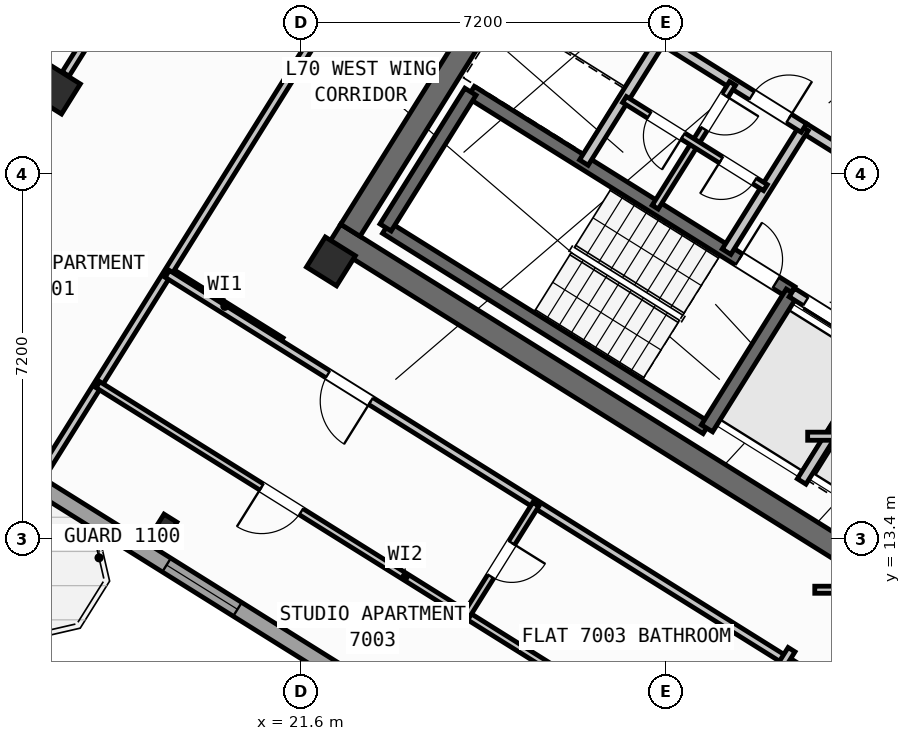
"""IFC4 building model, lengths in metres.
Left out: names, types, materials, properties, quantities, classifications, styles, units other than length and angle.
Written with IfcOpenShell. Run it as: python <this file> out.ifc"""

import sys

from ifc_helpers import new_model, si_unit, direction, frame, frame_2d, origin, origin_2d, place, context, subcontext, project, spatial, rectangle, hollow_rectangle, i_section, extrude, source, transform, mapped, element, fill, save


model = new_model("IFC4")
c1 = context("Model", 3, precision=1e-05, world=origin(), true_north=direction((0.0, 1.0)))
c2 = subcontext(c1, "Body", "Model", "MODEL_VIEW")
j1 = project(units=[si_unit("LENGTHUNIT", "METRE"), si_unit("PLANEANGLEUNIT", "RADIAN")], contexts=[c1])
p1 = place(None, origin())
s1 = spatial("IfcSite", under=j1, at=p1, CompositionType="ELEMENT")
p2 = place(p1, origin())
s2 = spatial("IfcBuilding", under=s1, at=p2, CompositionType="ELEMENT")
p3 = place(p2, frame((0.0, 0.0, 277.2)))
s3 = spatial("IfcBuildingStorey", under=s2, at=p3, CompositionType="ELEMENT", Elevation=277.2)
p4 = place(p3, frame((33.324, 12.503, 0.0), z_axis=(0.0, 0.0, 1.0), x_axis=(-0.848043529849, 0.529926571782, 0.0)))
e1 = element("IfcWall", 1, at=p4, inside=s3, PredefinedType="SHEAR", context=c2, shape_type="SweptSolid", body=[
    extrude(rectangle(XDim=13.04, YDim=0.45, at=frame_2d((6.52, 0.0))), origin(), (0.0, 0.0, 1.0), 3.35),
])
p5 = place(p3, frame((26.007, 24.976, 0.0), z_axis=(0.0, 0.0, 1.0), x_axis=(-0.529931155655, -0.848040665456, 0.0)))
e2 = element("IfcWall", 2, at=p5, inside=s3, PredefinedType="SHEAR", context=c2, shape_type="SweptSolid", body=[
    extrude(rectangle(XDim=6.475, YDim=0.45, at=frame_2d((3.238, 0.0))), origin(), (0.0, 0.0, 1.0), 3.35),
])
m1 = source(origin(), c2, "Body", "SweptSolid", [
    extrude(hollow_rectangle(XDim=0.7, YDim=0.7, WallThickness=0.028, at=origin_2d()), origin(), (0.0, 0.0, 1.0), 3.6),
])
p6 = place(p3, frame((22.191, 18.87, 0.0), z_axis=(0.0, 0.0, 1.0), x_axis=(-0.848048096156, 0.529919264233, 0.0)))
e3 = element("IfcColumn", 3, at=p6, inside=s3, PredefinedType="COLUMN", context=c2, shape_type="MappedRepresentation", body=[
    mapped(m1, transform((0.0, 0.0, 0.0), scale=1.0)),
])
m2 = source(origin(), c2, "Body", "SweptSolid", [
    extrude(i_section(OverallWidth=0.3, OverallDepth=0.45, WebThickness=0.014, FlangeThickness=0.026, at=origin_2d()), origin(), (0.0, 0.0, 1.0), 3.6),
])
p7 = place(p3, frame((18.906, 13.612, 0.0), z_axis=(0.0, 0.0, 1.0), x_axis=(-0.848048096156, 0.529919264233, 0.0)))
e4 = element("IfcColumn", 4, at=p7, inside=s3, PredefinedType="COLUMN", context=c2, shape_type="MappedRepresentation", body=[
    mapped(m2, transform((0.0, 0.0, 0.0), scale=1.0)),
])
p8 = place(p3, frame((16.764, 22.261, 0.0), z_axis=(0.0, 0.0, 1.0), x_axis=(-0.848048096156, 0.529919264233, 0.0)))
e5 = element("IfcColumn", 5, at=p8, inside=s3, PredefinedType="COLUMN", context=c2, shape_type="MappedRepresentation", body=[
    mapped(m1, transform((0.0, 0.0, 0.0), scale=1.0)),
])
p9 = place(p3, frame((29.268, 6.429, 0.0), z_axis=(0.0, 0.0, 1.0), x_axis=(-0.848049971435, 0.529916263149, 0.0)))
e6 = element("IfcWall", 6, at=p9, inside=s3, PredefinedType="STANDARD", context=c2, shape_type="SweptSolid", body=[
    extrude(rectangle(XDim=31.588, YDim=0.32, at=frame_2d((15.794, 0.0))), origin(), (0.0, 0.0, 1.0), 3.35),
])
p10 = place(p9, frame((16.362, 0.0, 0.0)))
e7 = element("IfcOpeningElement", 7, at=p10, cuts=e6, PredefinedType="OPENING", context=c2, shape_type="SweptSolid", body=[
    extrude(rectangle(XDim=1.2, YDim=2.15, at=frame_2d((0.6, 1.075))), frame((0.0, 0.17, 0.0), z_axis=(0.0, -1.0, 0.0), x_axis=(1.0, 0.0, 0.0)), (0.0, 0.0, 1.0), 0.34),
])
p11 = place(p9, frame((3.859, 0.0, 0.9)))
e8 = element("IfcOpeningElement", 8, at=p11, cuts=e6, PredefinedType="OPENING", context=c2, shape_type="SweptSolid", body=[
    extrude(rectangle(XDim=1.65, YDim=1.45, at=frame_2d((0.825, 0.725))), frame((0.0, 0.17, 0.0), z_axis=(0.0, -1.0, 0.0), x_axis=(1.0, 0.0, 0.0)), (0.0, 0.0, 1.0), 0.34),
])
p12 = place(p9, frame((10.519, 0.0, 0.9)))
e9 = element("IfcOpeningElement", 9, at=p12, cuts=e6, PredefinedType="OPENING", context=c2, shape_type="SweptSolid", body=[
    extrude(rectangle(XDim=1.65, YDim=1.45, at=frame_2d((0.825, 0.725))), frame((0.0, 0.17, 0.0), z_axis=(0.0, -1.0, 0.0), x_axis=(1.0, 0.0, 0.0)), (0.0, 0.0, 1.0), 0.34),
])
p13 = place(p9, frame((20.015, 0.0, 0.95)))
e10 = element("IfcOpeningElement", 10, at=p13, cuts=e6, PredefinedType="OPENING", context=c2, shape_type="SweptSolid", body=[
    extrude(rectangle(XDim=1.95, YDim=1.35, at=frame_2d((0.975, 0.675))), frame((0.0, 0.17, 0.0), z_axis=(0.0, -1.0, 0.0), x_axis=(1.0, 0.0, 0.0)), (0.0, 0.0, 1.0), 0.34),
])
p14 = place(p9, frame((23.715, 0.0, 1.0)))
e11 = element("IfcOpeningElement", 11, at=p14, cuts=e6, PredefinedType="OPENING", context=c2, shape_type="SweptSolid", body=[
    extrude(rectangle(XDim=0.9, YDim=1.25, at=frame_2d((0.45, 0.625))), frame((0.0, 0.17, 0.0), z_axis=(0.0, -1.0, 0.0), x_axis=(1.0, 0.0, 0.0)), (0.0, 0.0, 1.0), 0.34),
])
p15 = place(p9, frame((27.706, 0.0, 0.9)))
e12 = element("IfcOpeningElement", 12, at=p15, cuts=e6, PredefinedType="OPENING", context=c2, shape_type="SweptSolid", body=[
    extrude(rectangle(XDim=1.65, YDim=1.45, at=frame_2d((0.825, 0.725))), frame((0.0, 0.17, 0.0), z_axis=(0.0, -1.0, 0.0), x_axis=(1.0, 0.0, 0.0)), (0.0, 0.0, 1.0), 0.34),
])
p16 = place(p3, frame((29.605, 15.581, 0.0), z_axis=(0.0, 0.0, 1.0), x_axis=(-0.848036911448, 0.529937163087, 0.0)))
e13 = element("IfcWall", 13, at=p16, inside=s3, PredefinedType="SHEAR", context=c2, shape_type="SweptSolid", body=[
    extrude(rectangle(XDim=7.46, YDim=0.26, at=frame_2d((3.73, 0.0))), origin(), (0.0, 0.0, 1.0), 3.35),
])
p17 = place(p3, frame((31.28, 18.261, 0.0), z_axis=(0.0, 0.0, 1.0), x_axis=(-0.848051618787, 0.529913626805, 0.0)))
e14 = element("IfcWall", 14, at=p17, inside=s3, PredefinedType="SHEAR", context=c2, shape_type="SweptSolid", body=[
    extrude(rectangle(XDim=7.46, YDim=0.26, at=frame_2d((3.73, 0.0))), origin(), (0.0, 0.0, 1.0), 3.35),
])
p18 = place(p17, frame((0.36, 0.0, 0.0)))
e15 = element("IfcOpeningElement", 15, at=p18, cuts=e14, PredefinedType="OPENING", context=c2, shape_type="SweptSolid", body=[
    extrude(rectangle(XDim=0.86, YDim=2.05, at=frame_2d((0.43, 1.025))), frame((0.0, 0.14, 0.0), z_axis=(0.0, -1.0, 0.0), x_axis=(1.0, 0.0, 0.0)), (0.0, 0.0, 1.0), 0.28),
])
p19 = place(p3, frame((31.288, 18.256, 0.0), z_axis=(0.0, 0.0, 1.0), x_axis=(-0.529943379326, -0.848033026897, 0.0)))
e16 = element("IfcWall", 16, at=p19, inside=s3, PredefinedType="SHEAR", context=c2, shape_type="SweptSolid", body=[
    extrude(rectangle(XDim=3.16, YDim=0.26, at=frame_2d((1.58, 0.0))), origin(), (0.0, 0.0, 1.0), 3.35),
])
p20 = place(p3, frame((24.945, 22.22, 0.0), z_axis=(0.0, 0.0, 1.0), x_axis=(-0.529908658664, -0.84805472316, 0.0)))
e17 = element("IfcWall", 17, at=p20, inside=s3, PredefinedType="SHEAR", context=c2, shape_type="SweptSolid", body=[
    extrude(rectangle(XDim=3.16, YDim=0.26, at=frame_2d((1.58, 0.0))), origin(), (0.0, 0.0, 1.0), 3.35),
])
p21 = place(p3, frame((38.046, 21.108, 0.0), z_axis=(0.0, 0.0, 1.0), x_axis=(-0.848054434086, 0.529909121291, 0.0)))
e18 = element("IfcWall", 18, at=p21, inside=s3, PredefinedType="SHEAR", context=c2, shape_type="SweptSolid", body=[
    extrude(rectangle(XDim=7.33, YDim=0.26, at=frame_2d((3.665, 0.0))), origin(), (0.0, 0.0, 1.0), 3.35),
])
p22 = place(p21, frame((0.22, 0.0, 0.0)))
e19 = element("IfcOpeningElement", 19, at=p22, cuts=e18, PredefinedType="OPENING", context=c2, shape_type="SweptSolid", body=[
    extrude(rectangle(XDim=1.1, YDim=2.1, at=frame_2d((0.55, 1.05))), frame((0.0, 0.14, 0.0), z_axis=(0.0, -1.0, 0.0), x_axis=(1.0, 0.0, 0.0)), (0.0, 0.0, 1.0), 0.28),
])
p23 = place(p3, frame((34.933, 15.978, 0.0), z_axis=(0.0, 0.0, 1.0), x_axis=(-0.848055739377, 0.529907032327, 0.0)))
e20 = element("IfcWall", 20, at=p23, inside=s3, PredefinedType="STANDARD", context=c2, shape_type="SweptSolid", body=[
    extrude(rectangle(XDim=4.298, YDim=0.2, at=frame_2d((2.149, 0.0))), origin(), (0.0, 0.0, 1.0), 3.34),
])
p24 = place(p23, frame((0.448, 0.0, 0.0)))
e21 = element("IfcOpeningElement", 21, at=p24, cuts=e20, PredefinedType="OPENING", context=c2, shape_type="SweptSolid", body=[
    extrude(rectangle(XDim=1.3, YDim=2.2, at=frame_2d((0.65, 1.1))), frame((0.0, 0.11, 0.0), z_axis=(0.0, -1.0, 0.0), x_axis=(1.0, 0.0, 0.0)), (0.0, 0.0, 1.0), 0.22),
])
p25 = place(p23, frame((2.523, 0.0, 0.0)))
e22 = element("IfcOpeningElement", 22, at=p25, cuts=e20, PredefinedType="OPENING", context=c2, shape_type="SweptSolid", body=[
    extrude(rectangle(XDim=1.45, YDim=2.25, at=frame_2d((0.725, 1.125))), frame((0.0, 0.11, 0.0), z_axis=(0.0, -1.0, 0.0), x_axis=(1.0, 0.0, 0.0)), (0.0, 0.0, 1.0), 0.22),
])
p26 = place(p3, frame((36.459, 18.421, 0.0), z_axis=(0.0, 0.0, 1.0), x_axis=(-0.848059591691, 0.529900867089, 0.0)))
e23 = element("IfcWall", 23, at=p26, inside=s3, PredefinedType="STANDARD", context=c2, shape_type="SweptSolid", body=[
    extrude(rectangle(XDim=5.818, YDim=0.2, at=frame_2d((2.909, 0.0))), origin(), (0.0, 0.0, 1.0), 3.34),
])
p27 = place(p26, frame((2.598, 0.0, 0.0)))
e24 = element("IfcOpeningElement", 24, at=p27, cuts=e23, PredefinedType="OPENING", context=c2, shape_type="SweptSolid", body=[
    extrude(rectangle(XDim=1.15, YDim=2.1, at=frame_2d((0.575, 1.05))), frame((0.0, 0.11, 0.0), z_axis=(0.0, -1.0, 0.0), x_axis=(1.0, 0.0, 0.0)), (0.0, 0.0, 1.0), 0.22),
])
p28 = place(p3, frame((33.029, 17.003, 0.0), z_axis=(0.0, 0.0, 1.0), x_axis=(-0.529916267533, -0.848049968695, 0.0)))
e25 = element("IfcWall", 25, at=p28, inside=s3, PredefinedType="STANDARD", context=c2, shape_type="SweptSolid", body=[
    extrude(rectangle(XDim=2.92, YDim=0.2, at=frame_2d((1.46, 0.0))), origin(), (0.0, 0.0, 1.0), 3.34),
])
for number, where, z_axis, x_axis in (
    (26, (31.525, 21.504, 0.0), (0.0, 0.0, 1.0), (-0.53, -0.848, 0.0)),
    (27, (28.71, 23.263, 0.0), (0.0, 0.0, 1.0), (-0.53, -0.848, 0.0)),
):
    element("IfcWall", number, at=place(p3, frame(where, z_axis=z_axis, x_axis=x_axis)), inside=s3, PredefinedType="STANDARD", context=c2, shape_type="SweptSolid", body=[
        extrude(rectangle(XDim=2.88, YDim=0.2, at=frame_2d((1.44, 0.0))), origin(), (0.0, 0.0, 1.0), 3.34),
    ])
p29 = place(p3, frame((31.525, 21.504, 0.0), z_axis=(0.0, 0.0, 1.0), x_axis=(-0.848042066329, 0.529928913853, 0.0)))
e28 = element("IfcWall", 28, at=p29, inside=s3, PredefinedType="STANDARD", context=c2, shape_type="SweptSolid", body=[
    extrude(rectangle(XDim=6.268, YDim=0.2, at=frame_2d((3.134, 0.0))), origin(), (0.0, 0.0, 1.0), 3.34),
])
p30 = place(p29, frame((4.4, 0.0, 0.0)))
e29 = element("IfcOpeningElement", 29, at=p30, cuts=e28, PredefinedType="OPENING", context=c2, shape_type="SweptSolid", body=[
    extrude(rectangle(XDim=0.86, YDim=2.05, at=frame_2d((0.43, 1.025))), frame((0.0, 0.11, 0.0), z_axis=(0.0, -1.0, 0.0), x_axis=(1.0, 0.0, 0.0)), (0.0, 0.0, 1.0), 0.22),
])
p31 = place(p29, frame((0.35, 0.0, 0.0)))
e30 = element("IfcOpeningElement", 30, at=p31, cuts=e28, PredefinedType="OPENING", context=c2, shape_type="SweptSolid", body=[
    extrude(rectangle(XDim=0.86, YDim=2.05, at=frame_2d((0.43, 1.025))), frame((0.0, 0.11, 0.0), z_axis=(0.0, -1.0, 0.0), x_axis=(1.0, 0.0, 0.0)), (0.0, 0.0, 1.0), 0.22),
])
p32 = place(p3, frame((30.117, 22.384, 0.0), z_axis=(0.0, 0.0, 1.0), x_axis=(-0.529951914384, -0.848027693204, 0.0)))
e31 = element("IfcWall", 31, at=p32, inside=s3, PredefinedType="PLUMBINGWALL", context=c2, shape_type="SweptSolid", body=[
    extrude(rectangle(XDim=1.4, YDim=0.14, at=frame_2d((0.7, 0.0))), origin(), (0.0, 0.0, 1.0), 3.34),
])
p33 = place(p32, frame((0.28, 0.0, 0.0)))
e32 = element("IfcOpeningElement", 32, at=p33, cuts=e31, PredefinedType="OPENING", context=c2, shape_type="SweptSolid", body=[
    extrude(rectangle(XDim=0.78, YDim=2.05, at=frame_2d((0.39, 1.025))), frame((0.0, 0.08, 0.0), z_axis=(0.0, -1.0, 0.0), x_axis=(1.0, 0.0, 0.0)), (0.0, 0.0, 1.0), 0.16),
])
p34 = place(p3, frame((29.375, 21.196, 0.0), z_axis=(0.0, 0.0, 1.0), x_axis=(-0.529865479138, -0.848081702443, 0.0)))
e33 = element("IfcWall", 33, at=p34, inside=s3, PredefinedType="PLUMBINGWALL", context=c2, shape_type="SweptSolid", body=[
    extrude(rectangle(XDim=1.48, YDim=0.14, at=frame_2d((0.74, 0.0))), origin(), (0.0, 0.0, 1.0), 3.34),
])
p35 = place(p3, frame((30.766, 20.327, 0.0), z_axis=(0.0, 0.0, 1.0), x_axis=(-0.848052663127, 0.529911955482, 0.0)))
e34 = element("IfcWall", 34, at=p35, inside=s3, PredefinedType="PLUMBINGWALL", context=c2, shape_type="SweptSolid", body=[
    extrude(rectangle(XDim=3.28, YDim=0.14, at=frame_2d((1.64, 0.0))), origin(), (0.0, 0.0, 1.0), 3.34),
])
p36 = place(p35, frame((0.25, 0.0, 0.0)))
e35 = element("IfcOpeningElement", 35, at=p36, cuts=e34, PredefinedType="OPENING", context=c2, shape_type="SweptSolid", body=[
    extrude(rectangle(XDim=0.78, YDim=2.05, at=frame_2d((0.39, 1.025))), frame((0.0, 0.08, 0.0), z_axis=(0.0, -1.0, 0.0), x_axis=(1.0, 0.0, 0.0)), (0.0, 0.0, 1.0), 0.16),
])
p37 = place(p35, frame((1.92, 0.0, 0.0)))
e36 = element("IfcOpeningElement", 36, at=p37, cuts=e34, PredefinedType="OPENING", context=c2, shape_type="SweptSolid", body=[
    extrude(rectangle(XDim=0.78, YDim=2.05, at=frame_2d((0.39, 1.025))), frame((0.0, 0.08, 0.0), z_axis=(0.0, -1.0, 0.0), x_axis=(1.0, 0.0, 0.0)), (0.0, 0.0, 1.0), 0.16),
])
p38 = place(p3, frame((21.206, 17.292, 0.0), z_axis=(0.0, 0.0, 1.0), x_axis=(-0.848050851465, 0.529914854792, 0.0)))
e37 = element("IfcWall", 37, at=p38, inside=s3, PredefinedType="PARTITIONING", context=c2, shape_type="SweptSolid", body=[
    extrude(rectangle(XDim=2.61, YDim=0.16, at=frame_2d((1.305, 0.0))), origin(), (0.0, 0.0, 1.0), 3.34),
])
p39 = place(p3, frame((24.588, 27.631, 0.0), z_axis=(0.0, 0.0, 1.0), x_axis=(-0.529914586043, -0.848051019396, 0.0)))
e38 = element("IfcWall", 38, at=p39, inside=s3, PredefinedType="PARTITIONING", context=c2, shape_type="SweptSolid", body=[
    extrude(rectangle(XDim=15.35, YDim=0.16, at=frame_2d((7.675, 0.0))), origin(), (0.0, 0.0, 1.0), 3.34),
])
p40 = place(p3, frame((20.44, 28.145, 0.0), z_axis=(0.0, 0.0, 1.0), x_axis=(-0.529938869374, -0.84803584519, 0.0)))
e39 = element("IfcWall", 39, at=p40, inside=s3, PredefinedType="PARTITIONING", context=c2, shape_type="SweptSolid", body=[
    extrude(rectangle(XDim=6.576, YDim=0.16, at=frame_2d((3.288, 0.0))), origin(), (0.0, 0.0, 1.0), 2.875),
])
p41 = place(p3, frame((32.164, 10.374, 0.0), z_axis=(0.0, 0.0, 1.0), x_axis=(-0.848044107957, 0.529925646633, 0.0)))
e40 = element("IfcWall", 40, at=p41, inside=s3, PredefinedType="PARTITIONING", context=c2, shape_type="SweptSolid", body=[
    extrude(rectangle(XDim=15.57, YDim=0.16, at=frame_2d((7.785, 0.0))), origin(), (0.0, 0.0, 1.0), 3.34),
])
p42 = place(p41, frame((10.83, 0.0, 0.0)))
e41 = element("IfcOpeningElement", 41, at=p42, cuts=e40, PredefinedType="OPENING", context=c2, shape_type="SweptSolid", body=[
    extrude(rectangle(XDim=1.0, YDim=2.1, at=frame_2d((0.5, 1.05))), frame((0.0, 0.09, 0.0), z_axis=(0.0, -1.0, 0.0), x_axis=(1.0, 0.0, 0.0)), (0.0, 0.0, 1.0), 0.18),
])
p43 = place(p3, frame((31.282, 11.208, 0.0), z_axis=(0.0, 0.0, 1.0), x_axis=(-0.529938869374, -0.84803584519, 0.0)))
e42 = element("IfcWall", 42, at=p43, inside=s3, PredefinedType="PARTITIONING", context=c2, shape_type="SweptSolid", body=[
    extrude(rectangle(XDim=5.48, YDim=0.16, at=frame_2d((2.74, 0.0))), origin(), (0.0, 0.0, 1.0), 3.34),
])
p44 = place(p3, frame((29.72, 8.859, 0.0), z_axis=(0.0, 0.0, 1.0), x_axis=(-0.848049134363, 0.529917602752, 0.0)))
e43 = element("IfcWall", 43, at=p44, inside=s3, PredefinedType="PLUMBINGWALL", context=c2, shape_type="SweptSolid", body=[
    extrude(rectangle(XDim=14.3, YDim=0.14, at=frame_2d((7.15, 0.0))), origin(), (0.0, 0.0, 1.0), 3.34),
])
p45 = place(p44, frame((9.57, 0.0, 0.0)))
e44 = element("IfcOpeningElement", 44, at=p45, cuts=e43, PredefinedType="OPENING", context=c2, shape_type="SweptSolid", body=[
    extrude(rectangle(XDim=0.92, YDim=2.08, at=frame_2d((0.46, 1.04))), frame((0.0, 0.08, 0.0), z_axis=(0.0, -1.0, 0.0), x_axis=(1.0, 0.0, 0.0)), (0.0, 0.0, 1.0), 0.16),
])
p46 = place(p3, frame((26.237, 14.078, 0.0), z_axis=(0.0, 0.0, 1.0), x_axis=(-0.52995640672, -0.848024885824, 0.0)))
e45 = element("IfcWall", 45, at=p46, inside=s3, PredefinedType="PLUMBINGWALL", context=c2, shape_type="SweptSolid", body=[
    extrude(rectangle(XDim=2.58, YDim=0.14, at=frame_2d((1.29, 0.0))), origin(), (0.0, 0.0, 1.0), 3.34),
])
p47 = place(p46, frame((0.9, 0.0, 0.0)))
e46 = element("IfcOpeningElement", 46, at=p47, cuts=e45, PredefinedType="OPENING", context=c2, shape_type="SweptSolid", body=[
    extrude(rectangle(XDim=0.78, YDim=2.05, at=frame_2d((0.39, 1.025))), frame((0.0, 0.08, 0.0), z_axis=(0.0, -1.0, 0.0), x_axis=(1.0, 0.0, 0.0)), (0.0, 0.0, 1.0), 0.16),
])
p48 = place(p3, frame((31.6, 15.42, 0.0), z_axis=(0.0, 0.0, 1.0), x_axis=(1.0, 0.0, 0.0)))
e47 = element("IfcWall", 47, at=p48, inside=s3, PredefinedType="PARTITIONING", context=c2, shape_type="SweptSolid", body=[
    extrude(rectangle(XDim=2.984, YDim=0.16, at=frame_2d((1.492, 0.0))), origin(), (0.0, 0.0, 1.0), 3.34),
])
p49 = place(p3, frame((31.74, 12.39, 0.0), z_axis=(0.0, 0.0, 1.0), x_axis=(1.0, 0.0, 0.0)))
e48 = element("IfcWall", 48, at=p49, inside=s3, PredefinedType="PLUMBINGWALL", context=c2, shape_type="SweptSolid", body=[
    extrude(rectangle(XDim=1.069, YDim=0.14, at=frame_2d((0.534, 0.0))), origin(), (0.0, 0.0, 1.0), 3.34),
])
m3 = source(origin(), c2, "Body", "SweptSolid", [
    extrude(rectangle(XDim=1.65, YDim=1.45, at=frame_2d((0.825, 0.725))), frame((0.0, 0.03, 0.0), z_axis=(0.0, -1.0, 0.0), x_axis=(1.0, 0.0, 0.0)), (0.0, 0.0, 1.0), 0.06),
])
p50 = place(p12, origin())
e49 = element("IfcWindow", 49, at=p50, inside=s3, PartitioningType="SINGLE_PANEL", PredefinedType="WINDOW", context=c2, shape_type="MappedRepresentation", body=[
    mapped(m3, transform((0.0, 0.0, 0.0), scale=1.0)),
])
fill(e9, e49)
m4 = source(origin(), c2, "Body", "SweptSolid", [
    extrude(rectangle(XDim=0.86, YDim=2.05, at=frame_2d((0.43, 1.025))), frame((0.0, 0.025, 0.0), z_axis=(0.0, -1.0, 0.0), x_axis=(1.0, 0.0, 0.0)), (0.0, 0.0, 1.0), 0.05),
])
p51 = place(p18, frame((0.86, 0.0, 0.0), z_axis=(0.0, 0.0, 1.0), x_axis=(-1.0, 0.0, 0.0)))
e50 = element("IfcDoor", 50, at=p51, inside=s3, OperationType="SINGLE_SWING_LEFT", PredefinedType="DOOR", context=c2, shape_type="MappedRepresentation", body=[
    mapped(m4, transform((0.0, 0.0, 0.0), scale=1.0)),
])
fill(e15, e50)
m5 = source(origin(), c2, "Body", "SweptSolid", [
    extrude(rectangle(XDim=1.45, YDim=2.25, at=frame_2d((0.725, 1.125))), frame((0.0, 0.025, 0.0), z_axis=(0.0, -1.0, 0.0), x_axis=(1.0, 0.0, 0.0)), (0.0, 0.0, 1.0), 0.05),
])
p52 = place(p25, origin())
e51 = element("IfcDoor", 51, at=p52, inside=s3, OperationType="DOUBLE_DOOR_SLIDING", PredefinedType="DOOR", context=c2, shape_type="MappedRepresentation", body=[
    mapped(m5, transform((0.0, 0.0, 0.0), scale=1.0)),
])
fill(e22, e51)
p53 = place(p31, frame((0.86, 0.0, 0.0), z_axis=(0.0, 0.0, 1.0), x_axis=(-1.0, 0.0, 0.0)))
e52 = element("IfcDoor", 52, at=p53, inside=s3, OperationType="SINGLE_SWING_RIGHT", PredefinedType="DOOR", context=c2, shape_type="MappedRepresentation", body=[
    mapped(m4, transform((0.0, 0.0, 0.0), scale=1.0)),
])
fill(e30, e52)
m6 = source(origin(), c2, "Body", "SweptSolid", [
    extrude(rectangle(XDim=0.78, YDim=2.05, at=frame_2d((0.39, 1.025))), frame((0.0, 0.025, 0.0), z_axis=(0.0, -1.0, 0.0), x_axis=(1.0, 0.0, 0.0)), (0.0, 0.0, 1.0), 0.05),
])
p54 = place(p33, origin())
e53 = element("IfcDoor", 53, at=p54, inside=s3, OperationType="SINGLE_SWING_LEFT", PredefinedType="DOOR", context=c2, shape_type="MappedRepresentation", body=[
    mapped(m6, transform((0.0, 0.0, 0.0), scale=1.0)),
])
fill(e32, e53)
p55 = place(p36, origin())
e54 = element("IfcDoor", 54, at=p55, inside=s3, OperationType="SINGLE_SWING_RIGHT", PredefinedType="DOOR", context=c2, shape_type="MappedRepresentation", body=[
    mapped(m6, transform((0.0, 0.0, 0.0), scale=1.0)),
])
fill(e35, e54)
p56 = place(p37, origin())
e55 = element("IfcDoor", 55, at=p56, inside=s3, OperationType="SINGLE_SWING_LEFT", PredefinedType="DOOR", context=c2, shape_type="MappedRepresentation", body=[
    mapped(m6, transform((0.0, 0.0, 0.0), scale=1.0)),
])
fill(e36, e55)
m7 = source(origin(), c2, "Body", "SweptSolid", [
    extrude(rectangle(XDim=1.0, YDim=2.1, at=frame_2d((0.5, 1.05))), frame((0.0, 0.025, 0.0), z_axis=(0.0, -1.0, 0.0), x_axis=(1.0, 0.0, 0.0)), (0.0, 0.0, 1.0), 0.05),
])
p57 = place(p42, origin())
e56 = element("IfcDoor", 56, at=p57, inside=s3, OperationType="SINGLE_SWING_LEFT", PredefinedType="DOOR", context=c2, shape_type="MappedRepresentation", body=[
    mapped(m7, transform((0.0, 0.0, 0.0), scale=1.0)),
])
fill(e41, e56)
m8 = source(origin(), c2, "Body", "SweptSolid", [
    extrude(rectangle(XDim=0.92, YDim=2.08, at=frame_2d((0.46, 1.04))), frame((0.0, 0.025, 0.0), z_axis=(0.0, -1.0, 0.0), x_axis=(1.0, 0.0, 0.0)), (0.0, 0.0, 1.0), 0.05),
])
p58 = place(p45, origin())
e57 = element("IfcDoor", 57, at=p58, inside=s3, OperationType="SINGLE_SWING_RIGHT", PredefinedType="DOOR", context=c2, shape_type="MappedRepresentation", body=[
    mapped(m8, transform((0.0, 0.0, 0.0), scale=1.0)),
])
fill(e44, e57)
p59 = place(p47, origin())
e58 = element("IfcDoor", 58, at=p59, inside=s3, OperationType="SINGLE_SWING_LEFT", PredefinedType="DOOR", context=c2, shape_type="MappedRepresentation", body=[
    mapped(m6, transform((0.0, 0.0, 0.0), scale=1.0)),
])
fill(e46, e58)
save(model, sys.argv[1])
